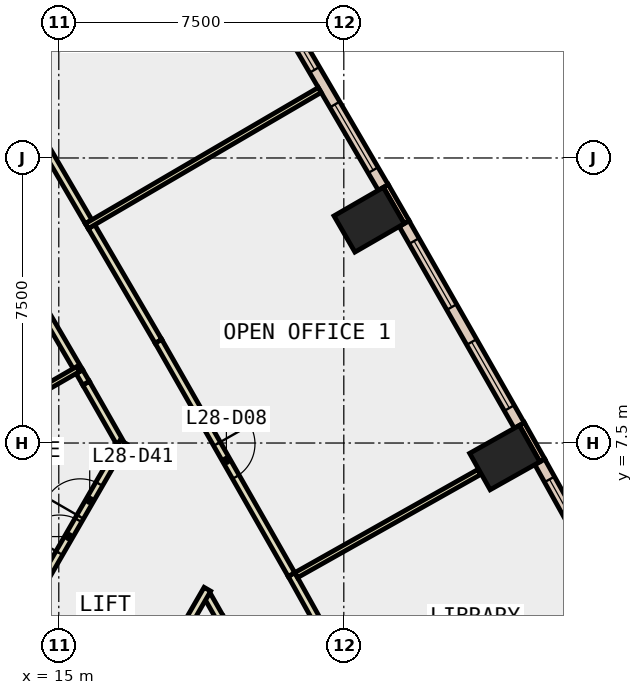
"""IFC4 building model, lengths in metres.
Left out: names, types, materials, properties, quantities, classifications, styles, units other than length and angle.
Written with IfcOpenShell. Run it as: python <this file> out.ifc"""

import sys

from ifc_helpers import new_model, si_unit, direction, frame, frame_2d, origin, origin_2d, place, context, subcontext, project, spatial, rectangle, extrude, element, fill, save


model = new_model("IFC4")
c1 = context("Model", 3, precision=1e-05, world=origin(), true_north=direction((0.0, 1.0)))
c2 = subcontext(c1, "Body", "Model", "MODEL_VIEW")
j1 = project(units=[si_unit("LENGTHUNIT", "METRE"), si_unit("PLANEANGLEUNIT", "RADIAN")], contexts=[c1])
p1 = place(None, origin())
s1 = spatial("IfcSite", under=j1, at=p1, CompositionType="ELEMENT")
p2 = place(p1, origin())
s2 = spatial("IfcBuilding", under=s1, at=p2, CompositionType="ELEMENT")
p3 = place(p2, frame((0.0, 0.0, 128.6)))
s3 = spatial("IfcBuildingStorey", under=s2, at=p3, CompositionType="ELEMENT", Elevation=128.6)
for number, where, z_axis, x_axis in (
    (1, (26.735, 7.117, -0.4), (0.0, 0.0, 1.0), (-0.49, 0.872, 0.0)),
    (2, (23.166, 13.375, -0.4), (0.0, 0.0, 1.0), (-0.5, 0.866, 0.0)),
):
    element("IfcColumn", number, at=place(p3, frame(where, z_axis=z_axis, x_axis=x_axis)), inside=s3, PredefinedType="COLUMN", context=c2, shape_type="SweptSolid", body=[
        extrude(rectangle(XDim=1.1, YDim=1.5, at=origin_2d()), origin(), (0.0, 0.0, 1.0), 4.0),
    ])
p4 = place(p3, frame((27.724, 7.042, 0.0), z_axis=(0.0, 0.0, 1.0), x_axis=(-0.490008344094, 0.871717742574, 0.0)))
e3 = element("IfcWall", 3, at=p4, inside=s3, PredefinedType="STANDARD", context=c2, shape_type="SweptSolid", body=[
    extrude(rectangle(XDim=1.1, YDim=0.15, at=frame_2d((0.55, 0.0))), origin(), (0.0, 0.0, 1.0), 3.6),
])
p5 = place(p3, frame((24.155, 13.311, 0.0), z_axis=(0.0, 0.0, 1.0), x_axis=(-0.499933745558, 0.866063652425, 0.0)))
e4 = element("IfcWall", 4, at=p5, inside=s3, PredefinedType="STANDARD", context=c2, shape_type="SweptSolid", body=[
    extrude(rectangle(XDim=1.1, YDim=0.15, at=frame_2d((0.55, 0.0))), origin(), (0.0, 0.0, 1.0), 3.6),
])
p6 = place(p3, frame((30.629, 1.662, 0.0), z_axis=(0.0, 0.0, 1.0), x_axis=(-0.486229342917, 0.873831234327, 0.0)))
e5 = element("IfcWall", 5, at=p6, inside=s3, PredefinedType="STANDARD", context=c2, shape_type="SweptSolid", body=[
    extrude(rectangle(XDim=6.114, YDim=0.3, at=frame_2d((3.057, 0.0))), origin(), (0.0, 0.0, 1.0), 3.6),
])
p7 = place(p6, frame((0.529, 0.0, 0.9)))
e6 = element("IfcOpeningElement", 6, at=p7, cuts=e5, PredefinedType="OPENING", context=c2, shape_type="SweptSolid", body=[
    extrude(rectangle(XDim=2.0, YDim=2.6, at=frame_2d((1.0, 1.3))), frame((0.0, 0.16, 0.0), z_axis=(0.0, -1.0, 0.0), x_axis=(1.0, 0.0, 0.0)), (0.0, 0.0, 1.0), 0.32),
])
p8 = place(p6, frame((3.586, 0.0, 0.9)))
e7 = element("IfcOpeningElement", 7, at=p8, cuts=e5, PredefinedType="OPENING", context=c2, shape_type="SweptSolid", body=[
    extrude(rectangle(XDim=2.0, YDim=2.6, at=frame_2d((1.0, 1.3))), frame((0.0, 0.16, 0.0), z_axis=(0.0, -1.0, 0.0), x_axis=(1.0, 0.0, 0.0)), (0.0, 0.0, 1.0), 0.32),
])
p9 = place(p3, frame((27.117, 7.961, 0.0), z_axis=(0.0, 0.0, 1.0), x_axis=(-0.495472401298, 0.868623681206, 0.0)))
e8 = element("IfcWall", 8, at=p9, inside=s3, PredefinedType="STANDARD", context=c2, shape_type="SweptSolid", body=[
    extrude(rectangle(XDim=6.115, YDim=0.3, at=frame_2d((3.058, 0.0))), origin(), (0.0, 0.0, 1.0), 3.6),
])
p10 = place(p9, frame((0.529, 0.0, 0.9)))
e9 = element("IfcOpeningElement", 9, at=p10, cuts=e8, PredefinedType="OPENING", context=c2, shape_type="SweptSolid", body=[
    extrude(rectangle(XDim=2.0, YDim=2.6, at=frame_2d((1.0, 1.3))), frame((0.0, 0.16, 0.0), z_axis=(0.0, -1.0, 0.0), x_axis=(1.0, 0.0, 0.0)), (0.0, 0.0, 1.0), 0.32),
])
p11 = place(p9, frame((3.587, 0.0, 0.9)))
e10 = element("IfcOpeningElement", 10, at=p11, cuts=e8, PredefinedType="OPENING", context=c2, shape_type="SweptSolid", body=[
    extrude(rectangle(XDim=2.0, YDim=2.6, at=frame_2d((1.0, 1.3))), frame((0.0, 0.16, 0.0), z_axis=(0.0, -1.0, 0.0), x_axis=(1.0, 0.0, 0.0)), (0.0, 0.0, 1.0), 0.32),
])
p12 = place(p3, frame((23.538, 14.224, 0.0), z_axis=(0.0, 0.0, 1.0), x_axis=(-0.504441987427, 0.863445586775, 0.0)))
e11 = element("IfcWall", 11, at=p12, inside=s3, PredefinedType="STANDARD", context=c2, shape_type="SweptSolid", body=[
    extrude(rectangle(XDim=6.114, YDim=0.3, at=frame_2d((3.057, 0.0))), origin(), (0.0, 0.0, 1.0), 3.6),
])
p13 = place(p12, frame((0.528, 0.0, 0.9)))
e12 = element("IfcOpeningElement", 12, at=p13, cuts=e11, PredefinedType="OPENING", context=c2, shape_type="SweptSolid", body=[
    extrude(rectangle(XDim=2.0, YDim=2.6, at=frame_2d((1.0, 1.3))), frame((0.0, 0.16, 0.0), z_axis=(0.0, -1.0, 0.0), x_axis=(1.0, 0.0, 0.0)), (0.0, 0.0, 1.0), 0.32),
])
p14 = place(p12, frame((3.585, 0.0, 0.9)))
e13 = element("IfcOpeningElement", 13, at=p14, cuts=e11, PredefinedType="OPENING", context=c2, shape_type="SweptSolid", body=[
    extrude(rectangle(XDim=2.0, YDim=2.6, at=frame_2d((1.0, 1.3))), frame((0.0, 0.16, 0.0), z_axis=(0.0, -1.0, 0.0), x_axis=(1.0, 0.0, 0.0)), (0.0, 0.0, 1.0), 0.32),
])
p15 = place(p3, frame((16.601, 7.526, 0.0), z_axis=(0.0, 0.0, 1.0), x_axis=(-0.495652400286, 0.868520983103, 0.0)))
e14 = element("IfcWall", 14, at=p15, inside=s3, PredefinedType="PARTITIONING", context=c2, shape_type="SweptSolid", body=[
    extrude(rectangle(XDim=1.784, YDim=0.2, at=frame_2d((0.892, 0.0))), origin(), (0.0, 0.0, 1.0), 3.6),
])
p16 = place(p3, frame((15.717, 9.075, 0.0), z_axis=(0.0, 0.0, 1.0), x_axis=(-0.50235401398, 0.864662040706, 0.0)))
e15 = element("IfcWall", 15, at=p16, inside=s3, PredefinedType="PARTITIONING", context=c2, shape_type="SweptSolid", body=[
    extrude(rectangle(XDim=0.35, YDim=0.2, at=frame_2d((0.175, 0.0))), origin(), (0.0, 0.0, 1.0), 3.6),
])
p17 = place(p3, frame((15.541, 9.378, 0.0), z_axis=(0.0, 0.0, 1.0), x_axis=(-0.504428354193, 0.863453551435, 0.0)))
e16 = element("IfcWall", 16, at=p17, inside=s3, PredefinedType="PARTITIONING", context=c2, shape_type="SweptSolid", body=[
    extrude(rectangle(XDim=5.365, YDim=0.2, at=frame_2d((2.682, 0.0))), origin(), (0.0, 0.0, 1.0), 3.6),
])
p18 = place(p17, frame((2.182, 0.0, 0.0)))
e17 = element("IfcOpeningElement", 17, at=p18, cuts=e16, PredefinedType="OPENING", context=c2, shape_type="SweptSolid", body=[
    extrude(rectangle(XDim=1.0, YDim=2.1, at=frame_2d((0.5, 1.05))), frame((0.0, 0.11, 0.0), z_axis=(0.0, -1.0, 0.0), x_axis=(1.0, 0.0, 0.0)), (0.0, 0.0, 1.0), 0.22),
])
p19 = place(p3, frame((19.243, 2.894, 0.0), z_axis=(0.0, 0.0, 1.0), x_axis=(-0.494108984218, 0.869399972231, 0.0)))
e18 = element("IfcWall", 18, at=p19, inside=s3, PredefinedType="PARTITIONING", context=c2, shape_type="SweptSolid", body=[
    extrude(rectangle(XDim=0.674, YDim=0.2, at=frame_2d((0.337, 0.0))), origin(), (0.0, 0.0, 1.0), 3.6),
])
p20 = place(p3, frame((21.124, 4.04, 0.0), z_axis=(0.0, 0.0, 1.0), x_axis=(0.486229558972, -0.873831114107, 0.0)))
e19 = element("IfcWall", 19, at=p20, inside=s3, PredefinedType="PARTITIONING", context=c2, shape_type="SweptSolid", body=[
    extrude(rectangle(XDim=7.136, YDim=0.2, at=frame_2d((3.568, 0.0))), origin(), (0.0, 0.0, 1.0), 3.6),
])
p21 = place(p20, frame((3.143, 0.0, 0.0)))
e20 = element("IfcOpeningElement", 20, at=p21, cuts=e19, PredefinedType="OPENING", context=c2, shape_type="SweptSolid", body=[
    extrude(rectangle(XDim=1.0, YDim=2.1, at=frame_2d((0.5, 1.05))), frame((0.0, 0.11, 0.0), z_axis=(0.0, -1.0, 0.0), x_axis=(1.0, 0.0, 0.0)), (0.0, 0.0, 1.0), 0.22),
])
p22 = place(p3, frame((15.86, 13.193, 0.0), z_axis=(0.0, 0.0, 1.0), x_axis=(0.504383407959, -0.863479807393, 0.0)))
e21 = element("IfcWall", 21, at=p22, inside=s3, PredefinedType="PARTITIONING", context=c2, shape_type="SweptSolid", body=[
    extrude(rectangle(XDim=3.495, YDim=0.2, at=frame_2d((1.748, 0.0))), origin(), (0.0, 0.0, 1.0), 3.6),
])
p23 = place(p3, frame((17.623, 10.175, 0.0), z_axis=(0.0, 0.0, 1.0), x_axis=(0.4954688358, -0.868625714995, 0.0)))
e22 = element("IfcWall", 22, at=p23, inside=s3, PredefinedType="PARTITIONING", context=c2, shape_type="SweptSolid", body=[
    extrude(rectangle(XDim=7.064, YDim=0.2, at=frame_2d((3.532, 0.0))), origin(), (0.0, 0.0, 1.0), 3.6),
])
p24 = place(p23, frame((3.107, 0.0, 0.0)))
e23 = element("IfcOpeningElement", 23, at=p24, cuts=e22, PredefinedType="OPENING", context=c2, shape_type="SweptSolid", body=[
    extrude(rectangle(XDim=1.0, YDim=2.1, at=frame_2d((0.5, 1.05))), frame((0.0, 0.11, 0.0), z_axis=(0.0, -1.0, 0.0), x_axis=(1.0, 0.0, 0.0)), (0.0, 0.0, 1.0), 0.22),
])
p25 = place(p3, frame((14.023, 16.338, 0.0), z_axis=(0.0, 0.0, 1.0), x_axis=(0.50424043703, -0.863563304954, 0.0)))
e24 = element("IfcWall", 24, at=p25, inside=s3, PredefinedType="PARTITIONING", context=c2, shape_type="SweptSolid", body=[
    extrude(rectangle(XDim=3.492, YDim=0.2, at=frame_2d((1.746, 0.0))), origin(), (0.0, 0.0, 1.0), 3.6),
])
p26 = place(p3, frame((11.261, 6.994, 0.0), z_axis=(0.0, 0.0, 1.0), x_axis=(0.866013769041, 0.500020151426, 0.0)))
e25 = element("IfcWall", 25, at=p26, inside=s3, PredefinedType="PARTITIONING", context=c2, shape_type="SweptSolid", body=[
    extrude(rectangle(XDim=4.898, YDim=0.15, at=frame_2d((2.449, 0.0))), origin(), (0.0, 0.0, 1.0), 3.6),
])
p27 = place(p3, frame((13.827, 2.55, 0.0), z_axis=(0.0, 0.0, 1.0), x_axis=(0.500032637853, 0.866006559491, 0.0)))
e26 = element("IfcWall", 26, at=p27, inside=s3, PredefinedType="PARTITIONING", context=c2, shape_type="SweptSolid", body=[
    extrude(rectangle(XDim=5.746, YDim=0.2, at=frame_2d((2.873, 0.0))), origin(), (0.0, 0.0, 1.0), 3.6),
])
p28 = place(p27, frame((2.373, 0.0, 0.0)))
e27 = element("IfcOpeningElement", 27, at=p28, cuts=e26, PredefinedType="OPENING", context=c2, shape_type="SweptSolid", body=[
    extrude(rectangle(XDim=1.0, YDim=2.1, at=frame_2d((0.5, 1.05))), frame((0.0, 0.11, 0.0), z_axis=(0.0, -1.0, 0.0), x_axis=(1.0, 0.0, 0.0)), (0.0, 0.0, 1.0), 0.22),
])
p29 = place(p27, frame((3.473, 0.0, 0.0)))
e28 = element("IfcOpeningElement", 28, at=p29, cuts=e26, PredefinedType="OPENING", context=c2, shape_type="SweptSolid", body=[
    extrude(rectangle(XDim=1.0, YDim=2.1, at=frame_2d((0.5, 1.05))), frame((0.0, 0.11, 0.0), z_axis=(0.0, -1.0, 0.0), x_axis=(1.0, 0.0, 0.0)), (0.0, 0.0, 1.0), 0.22),
])
p30 = place(p3, frame((18.91, 3.653, 0.0), z_axis=(0.0, 0.0, 1.0), x_axis=(-0.500052967229, -0.865994820981, 0.0)))
e29 = element("IfcWall", 29, at=p30, inside=s3, PredefinedType="PARTITIONING", context=c2, shape_type="SweptSolid", body=[
    extrude(rectangle(XDim=5.179, YDim=0.2, at=frame_2d((2.59, 0.0))), origin(), (0.0, 0.0, 1.0), 3.6),
])
p31 = place(p3, frame((21.247, 4.024, 0.0), z_axis=(0.0, 0.0, 1.0), x_axis=(0.871261721438, 0.490818716795, 0.0)))
e30 = element("IfcWall", 30, at=p31, inside=s3, PredefinedType="PARTITIONING", context=c2, shape_type="SweptSolid", body=[
    extrude(rectangle(XDim=5.53, YDim=0.15, at=frame_2d((2.765, 0.0))), origin(), (0.0, 0.0, 1.0), 3.6),
])
p32 = place(p3, frame((15.736, 13.207, 0.0), z_axis=(0.0, 0.0, 1.0), x_axis=(0.863454426155, 0.504426856892, 0.0)))
e31 = element("IfcWall", 31, at=p32, inside=s3, PredefinedType="PARTITIONING", context=c2, shape_type="SweptSolid", body=[
    extrude(rectangle(XDim=7.099, YDim=0.15, at=frame_2d((3.55, 0.0))), origin(), (0.0, 0.0, 1.0), 3.6),
])
p33 = place(p8, origin())
e32 = element("IfcWindow", 32, at=p33, inside=s3, PartitioningType="SINGLE_PANEL", PredefinedType="WINDOW", context=c2, shape_type="SweptSolid", body=[
    extrude(rectangle(XDim=2.0, YDim=2.6, at=frame_2d((1.0, 1.3))), frame((0.0, 0.03, 0.0), z_axis=(0.0, -1.0, 0.0), x_axis=(1.0, 0.0, 0.0)), (0.0, 0.0, 1.0), 0.06),
])
fill(e7, e32)
p34 = place(p10, origin())
e33 = element("IfcWindow", 33, at=p34, inside=s3, PartitioningType="SINGLE_PANEL", PredefinedType="WINDOW", context=c2, shape_type="SweptSolid", body=[
    extrude(rectangle(XDim=2.0, YDim=2.6, at=frame_2d((1.0, 1.3))), frame((0.0, 0.03, 0.0), z_axis=(0.0, -1.0, 0.0), x_axis=(1.0, 0.0, 0.0)), (0.0, 0.0, 1.0), 0.06),
])
fill(e9, e33)
p35 = place(p11, origin())
e34 = element("IfcWindow", 34, at=p35, inside=s3, PartitioningType="SINGLE_PANEL", PredefinedType="WINDOW", context=c2, shape_type="SweptSolid", body=[
    extrude(rectangle(XDim=2.0, YDim=2.6, at=frame_2d((1.0, 1.3))), frame((0.0, 0.03, 0.0), z_axis=(0.0, -1.0, 0.0), x_axis=(1.0, 0.0, 0.0)), (0.0, 0.0, 1.0), 0.06),
])
fill(e10, e34)
p36 = place(p13, origin())
e35 = element("IfcWindow", 35, at=p36, inside=s3, PartitioningType="SINGLE_PANEL", PredefinedType="WINDOW", context=c2, shape_type="SweptSolid", body=[
    extrude(rectangle(XDim=2.0, YDim=2.6, at=frame_2d((1.0, 1.3))), frame((0.0, 0.03, 0.0), z_axis=(0.0, -1.0, 0.0), x_axis=(1.0, 0.0, 0.0)), (0.0, 0.0, 1.0), 0.06),
])
fill(e12, e35)
p37 = place(p14, origin())
e36 = element("IfcWindow", 36, at=p37, inside=s3, PartitioningType="SINGLE_PANEL", PredefinedType="WINDOW", context=c2, shape_type="SweptSolid", body=[
    extrude(rectangle(XDim=2.0, YDim=2.6, at=frame_2d((1.0, 1.3))), frame((0.0, 0.03, 0.0), z_axis=(0.0, -1.0, 0.0), x_axis=(1.0, 0.0, 0.0)), (0.0, 0.0, 1.0), 0.06),
])
fill(e13, e36)
p38 = place(p24, origin())
e37 = element("IfcDoor", 37, at=p38, inside=s3, OperationType="SINGLE_SWING_LEFT", PredefinedType="DOOR", context=c2, shape_type="SweptSolid", body=[
    extrude(rectangle(XDim=1.0, YDim=2.1, at=frame_2d((0.5, 1.05))), frame((0.0, 0.025, 0.0), z_axis=(0.0, -1.0, 0.0), x_axis=(1.0, 0.0, 0.0)), (0.0, 0.0, 1.0), 0.05),
])
fill(e23, e37)
p39 = place(p28, origin())
e38 = element("IfcDoor", 38, at=p39, inside=s3, OperationType="SINGLE_SWING_LEFT", PredefinedType="DOOR", context=c2, shape_type="SweptSolid", body=[
    extrude(rectangle(XDim=1.0, YDim=2.1, at=frame_2d((0.5, 1.05))), frame((0.0, 0.025, 0.0), z_axis=(0.0, -1.0, 0.0), x_axis=(1.0, 0.0, 0.0)), (0.0, 0.0, 1.0), 0.05),
])
fill(e27, e38)
p40 = place(p29, origin())
e39 = element("IfcDoor", 39, at=p40, inside=s3, OperationType="SINGLE_SWING_RIGHT", PredefinedType="DOOR", context=c2, shape_type="SweptSolid", body=[
    extrude(rectangle(XDim=1.0, YDim=2.1, at=frame_2d((0.5, 1.05))), frame((0.0, 0.025, 0.0), z_axis=(0.0, -1.0, 0.0), x_axis=(1.0, 0.0, 0.0)), (0.0, 0.0, 1.0), 0.05),
])
fill(e28, e39)
save(model, sys.argv[1])
